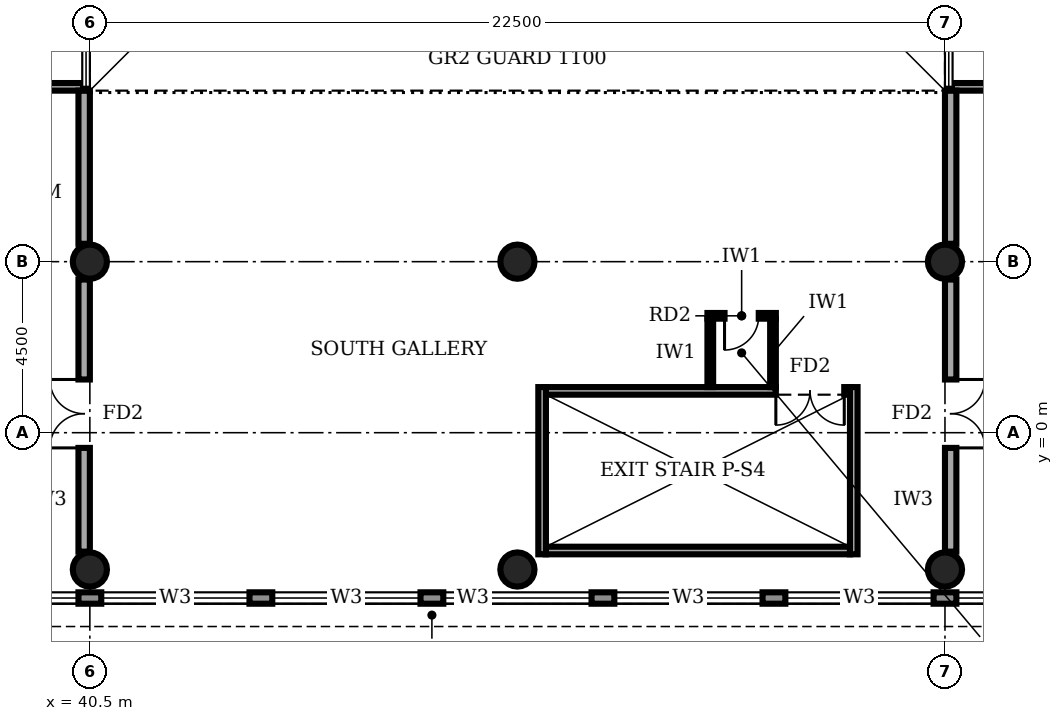
"""IFC4 building model, lengths in metres.
Left out: names, types, materials, properties, quantities, classifications, styles, units other than length and angle.
Written with IfcOpenShell. Run it as: python <this file> out.ifc"""

import sys

from ifc_helpers import new_model, si_unit, direction, frame, frame_2d, origin, origin_2d, place, context, subcontext, project, spatial, rectangle, circle, extrude, element, fill, save


model = new_model("IFC4")
c1 = context("Model", 3, precision=1e-05, world=origin(), true_north=direction((0.0, 1.0)))
c2 = subcontext(c1, "Body", "Model", "MODEL_VIEW")
j1 = project(units=[si_unit("LENGTHUNIT", "METRE"), si_unit("PLANEANGLEUNIT", "RADIAN")], contexts=[c1])
p1 = place(None, origin())
s1 = spatial("IfcSite", under=j1, at=p1, CompositionType="ELEMENT")
p2 = place(p1, origin())
s2 = spatial("IfcBuilding", under=s1, at=p2, CompositionType="ELEMENT")
p3 = place(p2, frame((0.0, 0.0, 16.0)))
s3 = spatial("IfcBuildingStorey", under=s2, at=p3, CompositionType="ELEMENT", Elevation=16.0)
for number, where, z_axis, x_axis in (
    (1, (40.5, -3.6, 0.0), (0.0, 0.0, 1.0), (1.0, 0.0, 0.0)),
    (2, (51.75, -3.6, 0.0), (0.0, 0.0, 1.0), (1.0, 0.0, 0.0)),
    (3, (63.0, -3.6, 0.0), (0.0, 0.0, 1.0), (1.0, 0.0, 0.0)),
    (4, (40.5, 4.5, 0.0), (0.0, 0.0, 1.0), (1.0, 0.0, 0.0)),
    (5, (51.75, 4.5, 0.0), (0.0, 0.0, 1.0), (1.0, 0.0, 0.0)),
    (6, (63.0, 4.5, 0.0), (0.0, 0.0, 1.0), (1.0, 0.0, 0.0)),
):
    element("IfcColumn", number, at=place(p3, frame(where, z_axis=z_axis, x_axis=x_axis)), inside=s3, PredefinedType="COLUMN", context=c2, shape_type="SweptSolid", body=[
        extrude(circle(Radius=0.45, at=origin_2d()), origin(), (0.0, 0.0, 1.0), 5.0),
    ])
p4 = place(p3, frame((0.02, -4.35, 0.0), z_axis=(0.0, 0.0, 1.0), x_axis=(1.0, 0.0, 0.0)))
e7 = element("IfcWall", 7, at=p4, inside=s3, PredefinedType="STANDARD", context=c2, shape_type="SweptSolid", body=[
    extrude(rectangle(XDim=98.96, YDim=0.3, at=frame_2d((49.48, 0.0))), origin(), (0.0, 0.0, 1.0), 4.7),
])
p5 = place(p4, frame((4.78, 0.0, 0.95)))
e8 = element("IfcOpeningElement", 8, at=p5, cuts=e7, PredefinedType="OPENING", context=c2, shape_type="SweptSolid", body=[
    extrude(rectangle(XDim=3.9, YDim=1.8, at=frame_2d((1.95, 0.9))), frame((0.0, 0.16, 0.0), z_axis=(0.0, -1.0, 0.0), x_axis=(1.0, 0.0, 0.0)), (0.0, 0.0, 1.0), 0.32),
])
p6 = place(p4, frame((9.28, 0.0, 0.95)))
e9 = element("IfcOpeningElement", 9, at=p6, cuts=e7, PredefinedType="OPENING", context=c2, shape_type="SweptSolid", body=[
    extrude(rectangle(XDim=3.9, YDim=1.8, at=frame_2d((1.95, 0.9))), frame((0.0, 0.16, 0.0), z_axis=(0.0, -1.0, 0.0), x_axis=(1.0, 0.0, 0.0)), (0.0, 0.0, 1.0), 0.32),
])
p7 = place(p4, frame((13.78, 0.0, 0.95)))
e10 = element("IfcOpeningElement", 10, at=p7, cuts=e7, PredefinedType="OPENING", context=c2, shape_type="SweptSolid", body=[
    extrude(rectangle(XDim=3.9, YDim=1.8, at=frame_2d((1.95, 0.9))), frame((0.0, 0.16, 0.0), z_axis=(0.0, -1.0, 0.0), x_axis=(1.0, 0.0, 0.0)), (0.0, 0.0, 1.0), 0.32),
])
p8 = place(p4, frame((18.28, 0.0, 0.95)))
e11 = element("IfcOpeningElement", 11, at=p8, cuts=e7, PredefinedType="OPENING", context=c2, shape_type="SweptSolid", body=[
    extrude(rectangle(XDim=3.9, YDim=1.8, at=frame_2d((1.95, 0.9))), frame((0.0, 0.16, 0.0), z_axis=(0.0, -1.0, 0.0), x_axis=(1.0, 0.0, 0.0)), (0.0, 0.0, 1.0), 0.32),
])
p9 = place(p4, frame((22.78, 0.0, 0.95)))
e12 = element("IfcOpeningElement", 12, at=p9, cuts=e7, PredefinedType="OPENING", context=c2, shape_type="SweptSolid", body=[
    extrude(rectangle(XDim=3.9, YDim=1.8, at=frame_2d((1.95, 0.9))), frame((0.0, 0.16, 0.0), z_axis=(0.0, -1.0, 0.0), x_axis=(1.0, 0.0, 0.0)), (0.0, 0.0, 1.0), 0.32),
])
p10 = place(p4, frame((27.28, 0.0, 0.95)))
e13 = element("IfcOpeningElement", 13, at=p10, cuts=e7, PredefinedType="OPENING", context=c2, shape_type="SweptSolid", body=[
    extrude(rectangle(XDim=3.9, YDim=1.8, at=frame_2d((1.95, 0.9))), frame((0.0, 0.16, 0.0), z_axis=(0.0, -1.0, 0.0), x_axis=(1.0, 0.0, 0.0)), (0.0, 0.0, 1.0), 0.32),
])
p11 = place(p4, frame((31.78, 0.0, 0.95)))
e14 = element("IfcOpeningElement", 14, at=p11, cuts=e7, PredefinedType="OPENING", context=c2, shape_type="SweptSolid", body=[
    extrude(rectangle(XDim=3.9, YDim=1.8, at=frame_2d((1.95, 0.9))), frame((0.0, 0.16, 0.0), z_axis=(0.0, -1.0, 0.0), x_axis=(1.0, 0.0, 0.0)), (0.0, 0.0, 1.0), 0.32),
])
p12 = place(p4, frame((36.28, 0.0, 0.95)))
e15 = element("IfcOpeningElement", 15, at=p12, cuts=e7, PredefinedType="OPENING", context=c2, shape_type="SweptSolid", body=[
    extrude(rectangle(XDim=3.9, YDim=1.8, at=frame_2d((1.95, 0.9))), frame((0.0, 0.16, 0.0), z_axis=(0.0, -1.0, 0.0), x_axis=(1.0, 0.0, 0.0)), (0.0, 0.0, 1.0), 0.32),
])
p13 = place(p4, frame((40.78, 0.0, 0.95)))
e16 = element("IfcOpeningElement", 16, at=p13, cuts=e7, PredefinedType="OPENING", context=c2, shape_type="SweptSolid", body=[
    extrude(rectangle(XDim=3.9, YDim=1.8, at=frame_2d((1.95, 0.9))), frame((0.0, 0.16, 0.0), z_axis=(0.0, -1.0, 0.0), x_axis=(1.0, 0.0, 0.0)), (0.0, 0.0, 1.0), 0.32),
])
p14 = place(p4, frame((45.28, 0.0, 0.95)))
e17 = element("IfcOpeningElement", 17, at=p14, cuts=e7, PredefinedType="OPENING", context=c2, shape_type="SweptSolid", body=[
    extrude(rectangle(XDim=3.9, YDim=1.8, at=frame_2d((1.95, 0.9))), frame((0.0, 0.16, 0.0), z_axis=(0.0, -1.0, 0.0), x_axis=(1.0, 0.0, 0.0)), (0.0, 0.0, 1.0), 0.32),
])
p15 = place(p4, frame((49.78, 0.0, 0.95)))
e18 = element("IfcOpeningElement", 18, at=p15, cuts=e7, PredefinedType="OPENING", context=c2, shape_type="SweptSolid", body=[
    extrude(rectangle(XDim=3.9, YDim=1.8, at=frame_2d((1.95, 0.9))), frame((0.0, 0.16, 0.0), z_axis=(0.0, -1.0, 0.0), x_axis=(1.0, 0.0, 0.0)), (0.0, 0.0, 1.0), 0.32),
])
p16 = place(p4, frame((54.28, 0.0, 0.95)))
e19 = element("IfcOpeningElement", 19, at=p16, cuts=e7, PredefinedType="OPENING", context=c2, shape_type="SweptSolid", body=[
    extrude(rectangle(XDim=3.9, YDim=1.8, at=frame_2d((1.95, 0.9))), frame((0.0, 0.16, 0.0), z_axis=(0.0, -1.0, 0.0), x_axis=(1.0, 0.0, 0.0)), (0.0, 0.0, 1.0), 0.32),
])
p17 = place(p4, frame((58.78, 0.0, 0.95)))
e20 = element("IfcOpeningElement", 20, at=p17, cuts=e7, PredefinedType="OPENING", context=c2, shape_type="SweptSolid", body=[
    extrude(rectangle(XDim=3.9, YDim=1.8, at=frame_2d((1.95, 0.9))), frame((0.0, 0.16, 0.0), z_axis=(0.0, -1.0, 0.0), x_axis=(1.0, 0.0, 0.0)), (0.0, 0.0, 1.0), 0.32),
])
p18 = place(p4, frame((63.28, 0.0, 0.95)))
e21 = element("IfcOpeningElement", 21, at=p18, cuts=e7, PredefinedType="OPENING", context=c2, shape_type="SweptSolid", body=[
    extrude(rectangle(XDim=3.9, YDim=1.8, at=frame_2d((1.95, 0.9))), frame((0.0, 0.16, 0.0), z_axis=(0.0, -1.0, 0.0), x_axis=(1.0, 0.0, 0.0)), (0.0, 0.0, 1.0), 0.32),
])
p19 = place(p4, frame((67.78, 0.0, 0.95)))
e22 = element("IfcOpeningElement", 22, at=p19, cuts=e7, PredefinedType="OPENING", context=c2, shape_type="SweptSolid", body=[
    extrude(rectangle(XDim=3.9, YDim=1.8, at=frame_2d((1.95, 0.9))), frame((0.0, 0.16, 0.0), z_axis=(0.0, -1.0, 0.0), x_axis=(1.0, 0.0, 0.0)), (0.0, 0.0, 1.0), 0.32),
])
p20 = place(p4, frame((72.28, 0.0, 0.95)))
e23 = element("IfcOpeningElement", 23, at=p20, cuts=e7, PredefinedType="OPENING", context=c2, shape_type="SweptSolid", body=[
    extrude(rectangle(XDim=3.9, YDim=1.8, at=frame_2d((1.95, 0.9))), frame((0.0, 0.16, 0.0), z_axis=(0.0, -1.0, 0.0), x_axis=(1.0, 0.0, 0.0)), (0.0, 0.0, 1.0), 0.32),
])
p21 = place(p4, frame((76.78, 0.0, 0.95)))
e24 = element("IfcOpeningElement", 24, at=p21, cuts=e7, PredefinedType="OPENING", context=c2, shape_type="SweptSolid", body=[
    extrude(rectangle(XDim=3.9, YDim=1.8, at=frame_2d((1.95, 0.9))), frame((0.0, 0.16, 0.0), z_axis=(0.0, -1.0, 0.0), x_axis=(1.0, 0.0, 0.0)), (0.0, 0.0, 1.0), 0.32),
])
p22 = place(p4, frame((81.28, 0.0, 0.95)))
e25 = element("IfcOpeningElement", 25, at=p22, cuts=e7, PredefinedType="OPENING", context=c2, shape_type="SweptSolid", body=[
    extrude(rectangle(XDim=3.9, YDim=1.8, at=frame_2d((1.95, 0.9))), frame((0.0, 0.16, 0.0), z_axis=(0.0, -1.0, 0.0), x_axis=(1.0, 0.0, 0.0)), (0.0, 0.0, 1.0), 0.32),
])
p23 = place(p4, frame((85.78, 0.0, 0.95)))
e26 = element("IfcOpeningElement", 26, at=p23, cuts=e7, PredefinedType="OPENING", context=c2, shape_type="SweptSolid", body=[
    extrude(rectangle(XDim=3.9, YDim=1.8, at=frame_2d((1.95, 0.9))), frame((0.0, 0.16, 0.0), z_axis=(0.0, -1.0, 0.0), x_axis=(1.0, 0.0, 0.0)), (0.0, 0.0, 1.0), 0.32),
])
p24 = place(p4, frame((90.28, 0.0, 0.95)))
e27 = element("IfcOpeningElement", 27, at=p24, cuts=e7, PredefinedType="OPENING", context=c2, shape_type="SweptSolid", body=[
    extrude(rectangle(XDim=3.9, YDim=1.8, at=frame_2d((1.95, 0.9))), frame((0.0, 0.16, 0.0), z_axis=(0.0, -1.0, 0.0), x_axis=(1.0, 0.0, 0.0)), (0.0, 0.0, 1.0), 0.32),
])
p25 = place(p4, frame((94.78, 0.0, 0.95)))
e28 = element("IfcOpeningElement", 28, at=p25, cuts=e7, PredefinedType="OPENING", context=c2, shape_type="SweptSolid", body=[
    extrude(rectangle(XDim=3.9, YDim=1.8, at=frame_2d((1.95, 0.9))), frame((0.0, 0.16, 0.0), z_axis=(0.0, -1.0, 0.0), x_axis=(1.0, 0.0, 0.0)), (0.0, 0.0, 1.0), 0.32),
])
p26 = place(p3, frame((28.8, 9.1, 0.0), z_axis=(0.0, 0.0, 1.0), x_axis=(1.0, 0.0, 0.0)))
e29 = element("IfcWall", 29, at=p26, inside=s3, PredefinedType="SOLIDWALL", context=c2, shape_type="SweptSolid", body=[
    extrude(rectangle(XDim=11.52, YDim=0.2, at=frame_2d((5.76, 0.0))), origin(), (0.0, 0.0, 1.0), 4.7),
])
p27 = place(p3, frame((63.18, 9.1, 0.0), z_axis=(0.0, 0.0, 1.0), x_axis=(1.0, 0.0, 0.0)))
e30 = element("IfcWall", 30, at=p27, inside=s3, PredefinedType="SOLIDWALL", context=c2, shape_type="SweptSolid", body=[
    extrude(rectangle(XDim=9.27, YDim=0.2, at=frame_2d((4.635, 0.0))), origin(), (0.0, 0.0, 1.0), 4.7),
])
p28 = place(p3, frame((52.5, 1.1, 0.0), z_axis=(0.0, 0.0, 1.0), x_axis=(1.0, 0.0, 0.0)))
e31 = element("IfcWall", 31, at=p28, inside=s3, PredefinedType="SOLIDWALL", context=c2, shape_type="SweptSolid", body=[
    extrude(rectangle(XDim=8.0, YDim=0.2, at=frame_2d((4.0, 0.0))), origin(), (0.0, 0.0, 1.0), 4.7),
])
p29 = place(p28, frame((6.05, 0.0, 0.0)))
e32 = element("IfcOpeningElement", 32, at=p29, cuts=e31, PredefinedType="OPENING", context=c2, shape_type="SweptSolid", body=[
    extrude(rectangle(XDim=1.8, YDim=2.1, at=frame_2d((0.9, 1.05))), frame((0.0, 0.11, 0.0), z_axis=(0.0, -1.0, 0.0), x_axis=(1.0, 0.0, 0.0)), (0.0, 0.0, 1.0), 0.22),
])
p30 = place(p3, frame((52.5, -3.1, 0.0), z_axis=(0.0, 0.0, 1.0), x_axis=(1.0, 0.0, 0.0)))
e33 = element("IfcWall", 33, at=p30, inside=s3, PredefinedType="SOLIDWALL", context=c2, shape_type="SweptSolid", body=[
    extrude(rectangle(XDim=8.0, YDim=0.2, at=frame_2d((4.0, 0.0))), origin(), (0.0, 0.0, 1.0), 4.7),
])
for number, where, z_axis, x_axis in (
    (34, (52.4, -3.2, 0.0), (0.0, 0.0, 1.0), (0.0, 1.0, 0.0)),
    (35, (60.6, -3.2, 0.0), (0.0, 0.0, 1.0), (0.0, 1.0, 0.0)),
):
    element("IfcWall", number, at=place(p3, frame(where, z_axis=z_axis, x_axis=x_axis)), inside=s3, PredefinedType="SOLIDWALL", context=c2, shape_type="SweptSolid", body=[
        extrude(rectangle(XDim=4.4, YDim=0.2, at=frame_2d((2.2, 0.0))), origin(), (0.0, 0.0, 1.0), 4.7),
    ])
p31 = place(p3, frame((40.35, -3.13, 0.0), z_axis=(0.0, 0.0, 1.0), x_axis=(0.0, 1.0, 0.0)))
e36 = element("IfcWall", 36, at=p31, inside=s3, PredefinedType="SOLIDWALL", context=c2, shape_type="SweptSolid", body=[
    extrude(rectangle(XDim=7.16, YDim=0.3, at=frame_2d((3.58, 0.0))), origin(), (0.0, 0.0, 1.0), 3.7),
])
p32 = place(p31, frame((2.73, 0.0, 0.0)))
e37 = element("IfcOpeningElement", 37, at=p32, cuts=e36, PredefinedType="OPENING", context=c2, shape_type="SweptSolid", body=[
    extrude(rectangle(XDim=1.8, YDim=2.1, at=frame_2d((0.9, 1.05))), frame((0.0, 0.16, 0.0), z_axis=(0.0, -1.0, 0.0), x_axis=(1.0, 0.0, 0.0)), (0.0, 0.0, 1.0), 0.32),
])
p33 = place(p3, frame((40.35, 4.97, 0.0), z_axis=(0.0, 0.0, 1.0), x_axis=(0.0, 1.0, 0.0)))
e38 = element("IfcWall", 38, at=p33, inside=s3, PredefinedType="SOLIDWALL", context=c2, shape_type="SweptSolid", body=[
    extrude(rectangle(XDim=4.03, YDim=0.3, at=frame_2d((2.015, 0.0))), origin(), (0.0, 0.0, 1.0), 4.7),
])
p34 = place(p3, frame((63.15, -3.13, 0.0), z_axis=(0.0, 0.0, 1.0), x_axis=(0.0, 1.0, 0.0)))
e39 = element("IfcWall", 39, at=p34, inside=s3, PredefinedType="SOLIDWALL", context=c2, shape_type="SweptSolid", body=[
    extrude(rectangle(XDim=7.16, YDim=0.3, at=frame_2d((3.58, 0.0))), origin(), (0.0, 0.0, 1.0), 3.7),
])
p35 = place(p34, frame((2.73, 0.0, 0.0)))
e40 = element("IfcOpeningElement", 40, at=p35, cuts=e39, PredefinedType="OPENING", context=c2, shape_type="SweptSolid", body=[
    extrude(rectangle(XDim=1.8, YDim=2.1, at=frame_2d((0.9, 1.05))), frame((0.0, 0.16, 0.0), z_axis=(0.0, -1.0, 0.0), x_axis=(1.0, 0.0, 0.0)), (0.0, 0.0, 1.0), 0.32),
])
p36 = place(p3, frame((63.15, 4.97, 0.0), z_axis=(0.0, 0.0, 1.0), x_axis=(0.0, 1.0, 0.0)))
e41 = element("IfcWall", 41, at=p36, inside=s3, PredefinedType="SOLIDWALL", context=c2, shape_type="SweptSolid", body=[
    extrude(rectangle(XDim=4.03, YDim=0.3, at=frame_2d((2.015, 0.0))), origin(), (0.0, 0.0, 1.0), 4.7),
])
p37 = place(p3, frame((58.475, 1.2, 0.0), z_axis=(0.0, 0.0, 1.0), x_axis=(0.0, 1.0, 0.0)))
e42 = element("IfcWall", 42, at=p37, inside=s3, PredefinedType="PARTITIONING", context=c2, shape_type="SweptSolid", body=[
    extrude(rectangle(XDim=1.8, YDim=0.15, at=frame_2d((0.9, 0.0))), origin(), (0.0, 0.0, 1.0), 4.7),
])
p38 = place(p3, frame((56.75, 3.075, 0.0), z_axis=(0.0, 0.0, 1.0), x_axis=(1.0, 0.0, 0.0)))
e43 = element("IfcWall", 43, at=p38, inside=s3, PredefinedType="PARTITIONING", context=c2, shape_type="SweptSolid", body=[
    extrude(rectangle(XDim=1.8, YDim=0.15, at=frame_2d((0.9, 0.0))), origin(), (0.0, 0.0, 1.0), 4.7),
])
p39 = place(p38, frame((0.45, 0.0, 0.0)))
e44 = element("IfcOpeningElement", 44, at=p39, cuts=e43, PredefinedType="OPENING", context=c2, shape_type="SweptSolid", body=[
    extrude(rectangle(XDim=0.9, YDim=2.1, at=frame_2d((0.45, 1.05))), frame((0.0, 0.085, 0.0), z_axis=(0.0, -1.0, 0.0), x_axis=(1.0, 0.0, 0.0)), (0.0, 0.0, 1.0), 0.17),
])
p40 = place(p3, frame((56.825, 1.2, 0.0), z_axis=(0.0, 0.0, 1.0), x_axis=(0.0, 1.0, 0.0)))
e45 = element("IfcWall", 45, at=p40, inside=s3, PredefinedType="PARTITIONING", context=c2, shape_type="SweptSolid", body=[
    extrude(rectangle(XDim=1.8, YDim=0.15, at=frame_2d((0.9, 0.0))), origin(), (0.0, 0.0, 1.0), 4.7),
])
p41 = place(p12, origin())
e46 = element("IfcWindow", 46, at=p41, inside=s3, PartitioningType="SINGLE_PANEL", PredefinedType="WINDOW", context=c2, shape_type="SweptSolid", body=[
    extrude(rectangle(XDim=3.9, YDim=1.8, at=frame_2d((1.95, 0.9))), frame((0.0, 0.03, 0.0), z_axis=(0.0, -1.0, 0.0), x_axis=(1.0, 0.0, 0.0)), (0.0, 0.0, 1.0), 0.06),
])
fill(e15, e46)
p42 = place(p13, origin())
e47 = element("IfcWindow", 47, at=p42, inside=s3, PartitioningType="SINGLE_PANEL", PredefinedType="WINDOW", context=c2, shape_type="SweptSolid", body=[
    extrude(rectangle(XDim=3.9, YDim=1.8, at=frame_2d((1.95, 0.9))), frame((0.0, 0.03, 0.0), z_axis=(0.0, -1.0, 0.0), x_axis=(1.0, 0.0, 0.0)), (0.0, 0.0, 1.0), 0.06),
])
fill(e16, e47)
p43 = place(p14, origin())
e48 = element("IfcWindow", 48, at=p43, inside=s3, PartitioningType="SINGLE_PANEL", PredefinedType="WINDOW", context=c2, shape_type="SweptSolid", body=[
    extrude(rectangle(XDim=3.9, YDim=1.8, at=frame_2d((1.95, 0.9))), frame((0.0, 0.03, 0.0), z_axis=(0.0, -1.0, 0.0), x_axis=(1.0, 0.0, 0.0)), (0.0, 0.0, 1.0), 0.06),
])
fill(e17, e48)
p44 = place(p15, origin())
e49 = element("IfcWindow", 49, at=p44, inside=s3, PartitioningType="SINGLE_PANEL", PredefinedType="WINDOW", context=c2, shape_type="SweptSolid", body=[
    extrude(rectangle(XDim=3.9, YDim=1.8, at=frame_2d((1.95, 0.9))), frame((0.0, 0.03, 0.0), z_axis=(0.0, -1.0, 0.0), x_axis=(1.0, 0.0, 0.0)), (0.0, 0.0, 1.0), 0.06),
])
fill(e18, e49)
p45 = place(p16, origin())
e50 = element("IfcWindow", 50, at=p45, inside=s3, PartitioningType="SINGLE_PANEL", PredefinedType="WINDOW", context=c2, shape_type="SweptSolid", body=[
    extrude(rectangle(XDim=3.9, YDim=1.8, at=frame_2d((1.95, 0.9))), frame((0.0, 0.03, 0.0), z_axis=(0.0, -1.0, 0.0), x_axis=(1.0, 0.0, 0.0)), (0.0, 0.0, 1.0), 0.06),
])
fill(e19, e50)
p46 = place(p17, origin())
e51 = element("IfcWindow", 51, at=p46, inside=s3, PartitioningType="SINGLE_PANEL", PredefinedType="WINDOW", context=c2, shape_type="SweptSolid", body=[
    extrude(rectangle(XDim=3.9, YDim=1.8, at=frame_2d((1.95, 0.9))), frame((0.0, 0.03, 0.0), z_axis=(0.0, -1.0, 0.0), x_axis=(1.0, 0.0, 0.0)), (0.0, 0.0, 1.0), 0.06),
])
fill(e20, e51)
p47 = place(p18, origin())
e52 = element("IfcWindow", 52, at=p47, inside=s3, PartitioningType="SINGLE_PANEL", PredefinedType="WINDOW", context=c2, shape_type="SweptSolid", body=[
    extrude(rectangle(XDim=3.9, YDim=1.8, at=frame_2d((1.95, 0.9))), frame((0.0, 0.03, 0.0), z_axis=(0.0, -1.0, 0.0), x_axis=(1.0, 0.0, 0.0)), (0.0, 0.0, 1.0), 0.06),
])
fill(e21, e52)
p48 = place(p29, frame((1.8, 0.0, 0.0), z_axis=(0.0, 0.0, 1.0), x_axis=(-1.0, 0.0, 0.0)))
e53 = element("IfcDoor", 53, at=p48, inside=s3, OperationType="DOUBLE_DOOR_SINGLE_SWING", PredefinedType="DOOR", context=c2, shape_type="SweptSolid", body=[
    extrude(rectangle(XDim=1.8, YDim=2.1, at=frame_2d((0.9, 1.05))), frame((0.0, 0.025, 0.0), z_axis=(0.0, -1.0, 0.0), x_axis=(1.0, 0.0, 0.0)), (0.0, 0.0, 1.0), 0.05),
])
fill(e32, e53)
p49 = place(p32, origin())
e54 = element("IfcDoor", 54, at=p49, inside=s3, OperationType="DOUBLE_DOOR_SINGLE_SWING", PredefinedType="DOOR", context=c2, shape_type="SweptSolid", body=[
    extrude(rectangle(XDim=1.8, YDim=2.1, at=frame_2d((0.9, 1.05))), frame((0.0, 0.025, 0.0), z_axis=(0.0, -1.0, 0.0), x_axis=(1.0, 0.0, 0.0)), (0.0, 0.0, 1.0), 0.05),
])
fill(e37, e54)
p50 = place(p35, frame((1.8, 0.0, 0.0), z_axis=(0.0, 0.0, 1.0), x_axis=(-1.0, 0.0, 0.0)))
e55 = element("IfcDoor", 55, at=p50, inside=s3, OperationType="DOUBLE_DOOR_SINGLE_SWING", PredefinedType="DOOR", context=c2, shape_type="SweptSolid", body=[
    extrude(rectangle(XDim=1.8, YDim=2.1, at=frame_2d((0.9, 1.05))), frame((0.0, 0.025, 0.0), z_axis=(0.0, -1.0, 0.0), x_axis=(1.0, 0.0, 0.0)), (0.0, 0.0, 1.0), 0.05),
])
fill(e40, e55)
p51 = place(p39, frame((0.9, 0.0, 0.0), z_axis=(0.0, 0.0, 1.0), x_axis=(-1.0, 0.0, 0.0)))
e56 = element("IfcDoor", 56, at=p51, inside=s3, OperationType="SINGLE_SWING_RIGHT", PredefinedType="DOOR", context=c2, shape_type="SweptSolid", body=[
    extrude(rectangle(XDim=0.9, YDim=2.1, at=frame_2d((0.45, 1.05))), frame((0.0, 0.025, 0.0), z_axis=(0.0, -1.0, 0.0), x_axis=(1.0, 0.0, 0.0)), (0.0, 0.0, 1.0), 0.05),
])
fill(e44, e56)
save(model, sys.argv[1])
